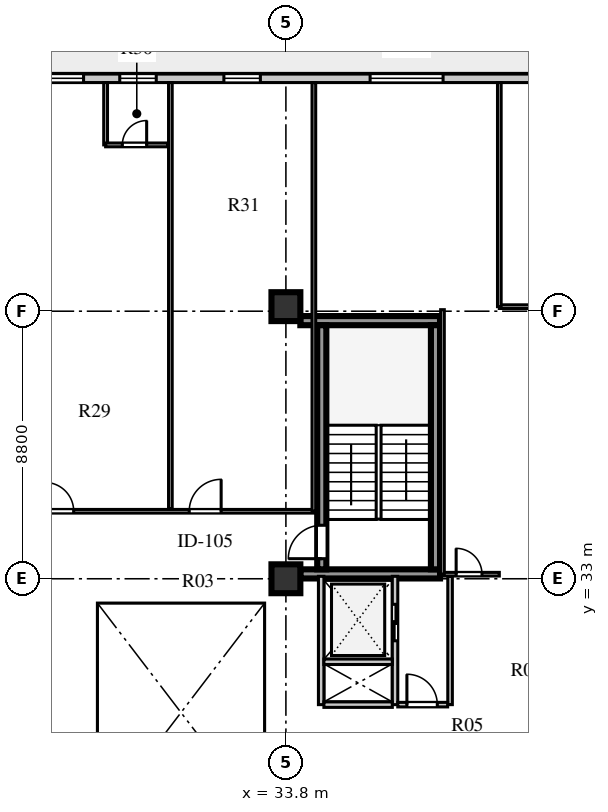
"""IFC4 building model, lengths in metres.
Left out: names, types, materials, properties, quantities, classifications, styles, units other than length and angle.
Written with IfcOpenShell. Run it as: python <this file> out.ifc"""

import sys

from ifc_helpers import new_model, si_unit, direction, frame, frame_2d, origin, origin_2d, place, context, subcontext, project, spatial, rectangle, extrude, element, fill, save


model = new_model("IFC4")
c1 = context("Model", 3, precision=1e-05, world=origin(), true_north=direction((0.0, 1.0)))
c2 = subcontext(c1, "Body", "Model", "MODEL_VIEW")
j1 = project(units=[si_unit("LENGTHUNIT", "METRE"), si_unit("PLANEANGLEUNIT", "RADIAN")], contexts=[c1])
p1 = place(None, origin())
s1 = spatial("IfcSite", under=j1, at=p1, CompositionType="ELEMENT")
p2 = place(p1, origin())
s2 = spatial("IfcBuilding", under=s1, at=p2, CompositionType="ELEMENT")
p3 = place(p2, frame((0.0, 0.0, 181.0)))
s3 = spatial("IfcBuildingStorey", under=s2, at=p3, CompositionType="ELEMENT", Elevation=181.0)
for number, where, z_axis, x_axis in (
    (1, (34.275, 33.16, 0.0), (0.0, 0.0, 1.0), (1.0, 0.0, 0.0)),
    (2, (34.275, 41.49, 0.0), (0.0, 0.0, 1.0), (1.0, 0.0, 0.0)),
):
    element("IfcWall", number, at=place(p3, frame(where, z_axis=z_axis, x_axis=x_axis)), inside=s3, PredefinedType="SHEAR", context=c2, shape_type="SweptSolid", body=[
        extrude(rectangle(XDim=4.595, YDim=0.3, at=frame_2d((2.298, 0.0))), origin(), (0.0, 0.0, 1.0), 3.6),
    ])
p4 = place(p3, frame((34.98, 33.31, 0.0), z_axis=(0.0, 0.0, 1.0), x_axis=(0.0, 1.0, 0.0)))
e3 = element("IfcWall", 3, at=p4, inside=s3, PredefinedType="SHEAR", context=c2, shape_type="SweptSolid", body=[
    extrude(rectangle(XDim=8.03, YDim=0.3, at=frame_2d((4.015, 0.0))), origin(), (0.0, 0.0, 1.0), 3.6),
])
p5 = place(p4, frame((0.35, 0.0, 0.0)))
e4 = element("IfcOpeningElement", 4, at=p5, cuts=e3, PredefinedType="OPENING", context=c2, shape_type="SweptSolid", body=[
    extrude(rectangle(XDim=1.1, YDim=2.1, at=frame_2d((0.55, 1.05))), frame((0.0, 0.16, 0.0), z_axis=(0.0, -1.0, 0.0), x_axis=(1.0, 0.0, 0.0)), (0.0, 0.0, 1.0), 0.32),
])
p6 = place(p3, frame((38.72, 33.31, 0.0), z_axis=(0.0, 0.0, 1.0), x_axis=(0.0, 1.0, 0.0)))
e5 = element("IfcWall", 5, at=p6, inside=s3, PredefinedType="SHEAR", context=c2, shape_type="SweptSolid", body=[
    extrude(rectangle(XDim=8.03, YDim=0.3, at=frame_2d((4.015, 0.0))), origin(), (0.0, 0.0, 1.0), 3.6),
])
for number, where, z_axis, x_axis in (
    (6, (33.8, 33.0, 0.0), (0.0, 0.0, 1.0), (1.0, 0.0, 0.0)),
    (7, (33.8, 41.95, 0.0), (0.0, 0.0, 1.0), (1.0, 0.0, 0.0)),
):
    element("IfcColumn", number, at=place(p3, frame(where, z_axis=z_axis, x_axis=x_axis)), inside=s3, PredefinedType="COLUMN", context=c2, shape_type="SweptSolid", body=[
        extrude(rectangle(XDim=0.95, YDim=0.95, at=origin_2d()), origin(), (0.0, 0.0, 1.0), 3.6),
    ])
p7 = place(p3, frame((45.55, 49.46, 0.0), z_axis=(0.0, 0.0, 1.0), x_axis=(-1.0, 0.0, 0.0)))
e8 = element("IfcWall", 8, at=p7, inside=s3, PredefinedType="STANDARD", context=c2, shape_type="SweptSolid", body=[
    extrude(rectangle(XDim=32.5, YDim=0.28, at=frame_2d((16.25, 0.0))), origin(), (0.0, 0.0, 1.0), 3.6),
])
p8 = place(p7, frame((30.55, 0.0, 0.0)))
e9 = element("IfcOpeningElement", 9, at=p8, cuts=e8, PredefinedType="OPENING", context=c2, shape_type="SweptSolid", body=[
    extrude(rectangle(XDim=1.0, YDim=2.05, at=frame_2d((0.5, 1.025))), frame((0.0, 0.15, 0.0), z_axis=(0.0, -1.0, 0.0), x_axis=(1.0, 0.0, 0.0)), (0.0, 0.0, 1.0), 0.3),
])
p9 = place(p7, frame((24.345, 0.0, 0.8)))
e10 = element("IfcOpeningElement", 10, at=p9, cuts=e8, PredefinedType="OPENING", context=c2, shape_type="SweptSolid", body=[
    extrude(rectangle(XDim=2.25, YDim=2.0, at=frame_2d((1.125, 1.0))), frame((0.0, 0.15, 0.0), z_axis=(0.0, -1.0, 0.0), x_axis=(1.0, 0.0, 0.0)), (0.0, 0.0, 1.0), 0.3),
])
p10 = place(p7, frame((18.405, 0.0, 0.8)))
e11 = element("IfcOpeningElement", 11, at=p10, cuts=e8, PredefinedType="OPENING", context=c2, shape_type="SweptSolid", body=[
    extrude(rectangle(XDim=1.2, YDim=1.75, at=frame_2d((0.6, 0.875))), frame((0.0, 0.15, 0.0), z_axis=(0.0, -1.0, 0.0), x_axis=(1.0, 0.0, 0.0)), (0.0, 0.0, 1.0), 0.3),
])
p11 = place(p7, frame((16.015, 0.0, 0.8)))
e12 = element("IfcOpeningElement", 12, at=p11, cuts=e8, PredefinedType="OPENING", context=c2, shape_type="SweptSolid", body=[
    extrude(rectangle(XDim=1.2, YDim=1.75, at=frame_2d((0.6, 0.875))), frame((0.0, 0.15, 0.0), z_axis=(0.0, -1.0, 0.0), x_axis=(1.0, 0.0, 0.0)), (0.0, 0.0, 1.0), 0.3),
])
p12 = place(p7, frame((12.59, 0.0, 0.8)))
e13 = element("IfcOpeningElement", 13, at=p12, cuts=e8, PredefinedType="OPENING", context=c2, shape_type="SweptSolid", body=[
    extrude(rectangle(XDim=1.2, YDim=1.75, at=frame_2d((0.6, 0.875))), frame((0.0, 0.15, 0.0), z_axis=(0.0, -1.0, 0.0), x_axis=(1.0, 0.0, 0.0)), (0.0, 0.0, 1.0), 0.3),
])
p13 = place(p7, frame((6.58, 0.0, 0.8)))
e14 = element("IfcOpeningElement", 14, at=p13, cuts=e8, PredefinedType="OPENING", context=c2, shape_type="SweptSolid", body=[
    extrude(rectangle(XDim=2.4, YDim=2.05, at=frame_2d((1.2, 1.025))), frame((0.0, 0.15, 0.0), z_axis=(0.0, -1.0, 0.0), x_axis=(1.0, 0.0, 0.0)), (0.0, 0.0, 1.0), 0.3),
])
p14 = place(p7, frame((1.37, 0.0, 0.8)))
e15 = element("IfcOpeningElement", 15, at=p14, cuts=e8, PredefinedType="OPENING", context=c2, shape_type="SweptSolid", body=[
    extrude(rectangle(XDim=2.1, YDim=1.95, at=frame_2d((1.05, 0.975))), frame((0.0, 0.15, 0.0), z_axis=(0.0, -1.0, 0.0), x_axis=(1.0, 0.0, 0.0)), (0.0, 0.0, 1.0), 0.3),
])
p15 = place(p3, frame((34.96, 28.86, 0.0), z_axis=(0.0, 0.0, 1.0), x_axis=(0.0, 1.0, 0.0)))
e16 = element("IfcWall", 16, at=p15, inside=s3, PredefinedType="SOLIDWALL", context=c2, shape_type="SweptSolid", body=[
    extrude(rectangle(XDim=4.22, YDim=0.18, at=frame_2d((2.11, 0.0))), origin(), (0.0, 0.0, 1.0), 3.6),
])
p16 = place(p3, frame((37.39, 28.86, 0.0), z_axis=(0.0, 0.0, 1.0), x_axis=(0.0, 1.0, 0.0)))
e17 = element("IfcWall", 17, at=p16, inside=s3, PredefinedType="SOLIDWALL", context=c2, shape_type="SweptSolid", body=[
    extrude(rectangle(XDim=4.22, YDim=0.18, at=frame_2d((2.11, 0.0))), origin(), (0.0, 0.0, 1.0), 3.6),
])
p17 = place(p16, frame((2.1, 0.0, 0.0)))
e18 = element("IfcOpeningElement", 18, at=p17, cuts=e17, PredefinedType="OPENING", context=c2, shape_type="SweptSolid", body=[
    extrude(rectangle(XDim=1.2, YDim=2.12, at=frame_2d((0.6, 1.06))), frame((0.0, 0.1, 0.0), z_axis=(0.0, -1.0, 0.0), x_axis=(1.0, 0.0, 0.0)), (0.0, 0.0, 1.0), 0.2),
])
for number, where, z_axis, x_axis in (
    (19, (35.05, 28.86, 0.0), (0.0, 0.0, 1.0), (1.0, 0.0, 0.0)),
    (20, (35.05, 30.27, 0.0), (0.0, 0.0, 1.0), (1.0, 0.0, 0.0)),
):
    element("IfcWall", number, at=place(p3, frame(where, z_axis=z_axis, x_axis=x_axis)), inside=s3, PredefinedType="SOLIDWALL", context=c2, shape_type="SweptSolid", body=[
        extrude(rectangle(XDim=2.25, YDim=0.18, at=frame_2d((1.125, 0.0))), origin(), (0.0, 0.0, 1.0), 3.6),
    ])
p18 = place(p3, frame((39.2, 28.86, 0.0), z_axis=(0.0, 0.0, 1.0), x_axis=(0.0, 1.0, 0.0)))
e21 = element("IfcWall", 21, at=p18, inside=s3, PredefinedType="PARTITIONING", context=c2, shape_type="SweptSolid", body=[
    extrude(rectangle(XDim=4.22, YDim=0.15, at=frame_2d((2.11, 0.0))), origin(), (0.0, 0.0, 1.0), 3.6),
])
p19 = place(p3, frame((37.48, 28.86, 0.0), z_axis=(0.0, 0.0, 1.0), x_axis=(1.0, 0.0, 0.0)))
e22 = element("IfcWall", 22, at=p19, inside=s3, PredefinedType="PARTITIONING", context=c2, shape_type="SweptSolid", body=[
    extrude(rectangle(XDim=1.64, YDim=0.15, at=frame_2d((0.82, 0.0))), origin(), (0.0, 0.0, 1.0), 3.6),
])
p20 = place(p19, frame((0.3, 0.0, 0.0)))
e23 = element("IfcOpeningElement", 23, at=p20, cuts=e22, PredefinedType="OPENING", context=c2, shape_type="SweptSolid", body=[
    extrude(rectangle(XDim=1.0, YDim=2.1, at=frame_2d((0.5, 1.05))), frame((0.0, 0.085, 0.0), z_axis=(0.0, -1.0, 0.0), x_axis=(1.0, 0.0, 0.0)), (0.0, 0.0, 1.0), 0.17),
])
p21 = place(p3, frame((25.22, 35.22, 0.0), z_axis=(0.0, 0.0, 1.0), x_axis=(1.0, 0.0, 0.0)))
e24 = element("IfcWall", 24, at=p21, inside=s3, PredefinedType="PARTITIONING", context=c2, shape_type="SweptSolid", body=[
    extrude(rectangle(XDim=9.5, YDim=0.12, at=frame_2d((4.75, 0.0))), origin(), (0.0, 0.0, 1.0), 3.6),
])
p22 = place(p21, frame((0.65, 0.0, 0.0)))
e25 = element("IfcOpeningElement", 25, at=p22, cuts=e24, PredefinedType="OPENING", context=c2, shape_type="SweptSolid", body=[
    extrude(rectangle(XDim=0.95, YDim=2.1, at=frame_2d((0.475, 1.05))), frame((0.0, 0.07, 0.0), z_axis=(0.0, -1.0, 0.0), x_axis=(1.0, 0.0, 0.0)), (0.0, 0.0, 1.0), 0.14),
])
p23 = place(p21, frame((5.4, 0.0, 0.0)))
e26 = element("IfcOpeningElement", 26, at=p23, cuts=e24, PredefinedType="OPENING", context=c2, shape_type="SweptSolid", body=[
    extrude(rectangle(XDim=1.05, YDim=2.1, at=frame_2d((0.525, 1.05))), frame((0.0, 0.07, 0.0), z_axis=(0.0, -1.0, 0.0), x_axis=(1.0, 0.0, 0.0)), (0.0, 0.0, 1.0), 0.14),
])
p24 = place(p3, frame((40.82, 41.95, 0.0), z_axis=(0.0, 0.0, 1.0), x_axis=(1.0, 0.0, 0.0)))
e27 = element("IfcWall", 27, at=p24, inside=s3, PredefinedType="PARTITIONING", context=c2, shape_type="SweptSolid", body=[
    extrude(rectangle(XDim=9.7, YDim=0.12, at=frame_2d((4.85, 0.0))), origin(), (0.0, 0.0, 1.0), 2.95),
])
p25 = place(p3, frame((34.72, 35.22, 0.0), z_axis=(0.0, 0.0, 1.0), x_axis=(0.0, 1.0, 0.0)))
e28 = element("IfcWall", 28, at=p25, inside=s3, PredefinedType="PARTITIONING", context=c2, shape_type="SweptSolid", body=[
    extrude(rectangle(XDim=14.1, YDim=0.12, at=frame_2d((7.05, 0.0))), origin(), (0.0, 0.0, 1.0), 3.6),
])
p26 = place(p3, frame((30.0, 35.3, 0.0), z_axis=(0.0, 0.0, 1.0), x_axis=(0.0, 1.0, 0.0)))
e29 = element("IfcWall", 29, at=p26, inside=s3, PredefinedType="PARTITIONING", context=c2, shape_type="SweptSolid", body=[
    extrude(rectangle(XDim=14.02, YDim=0.12, at=frame_2d((7.01, 0.0))), origin(), (0.0, 0.0, 1.0), 3.6),
])
p27 = place(p3, frame((27.87, 47.27, 0.0), z_axis=(0.0, 0.0, 1.0), x_axis=(0.0, 1.0, 0.0)))
e30 = element("IfcWall", 30, at=p27, inside=s3, PredefinedType="PLUMBINGWALL", context=c2, shape_type="SweptSolid", body=[
    extrude(rectangle(XDim=2.05, YDim=0.125, at=frame_2d((1.025, 0.0))), origin(), (0.0, 0.0, 1.0), 3.6),
])
p28 = place(p3, frame((27.87, 47.27, 0.0), z_axis=(0.0, 0.0, 1.0), x_axis=(1.0, 0.0, 0.0)))
e31 = element("IfcWall", 31, at=p28, inside=s3, PredefinedType="PLUMBINGWALL", context=c2, shape_type="SweptSolid", body=[
    extrude(rectangle(XDim=2.05, YDim=0.125, at=frame_2d((1.025, 0.0))), origin(), (0.0, 0.0, 1.0), 3.6),
])
p29 = place(p28, frame((0.55, 0.0, 0.0)))
e32 = element("IfcOpeningElement", 32, at=p29, cuts=e31, PredefinedType="OPENING", context=c2, shape_type="SweptSolid", body=[
    extrude(rectangle(XDim=0.8, YDim=2.05, at=frame_2d((0.4, 1.025))), frame((0.0, 0.073, 0.0), z_axis=(0.0, -1.0, 0.0), x_axis=(1.0, 0.0, 0.0)), (0.0, 0.0, 1.0), 0.145),
])
p30 = place(p3, frame((38.95, 33.15, 0.0), z_axis=(0.0, 0.0, 1.0), x_axis=(1.0, 0.0, 0.0)))
e33 = element("IfcWall", 33, at=p30, inside=s3, PredefinedType="PARTITIONING", context=c2, shape_type="SweptSolid", body=[
    extrude(rectangle(XDim=1.87, YDim=0.12, at=frame_2d((0.935, 0.0))), origin(), (0.0, 0.0, 1.0), 3.6),
])
p31 = place(p30, frame((0.45, 0.0, 0.0)))
e34 = element("IfcOpeningElement", 34, at=p31, cuts=e33, PredefinedType="OPENING", context=c2, shape_type="SweptSolid", body=[
    extrude(rectangle(XDim=0.85, YDim=2.05, at=frame_2d((0.425, 1.025))), frame((0.0, 0.07, 0.0), z_axis=(0.0, -1.0, 0.0), x_axis=(1.0, 0.0, 0.0)), (0.0, 0.0, 1.0), 0.14),
])
p32 = place(p3, frame((38.95, 33.15, 0.0), z_axis=(0.0, 0.0, 1.0), x_axis=(0.0, 1.0, 0.0)))
e35 = element("IfcWall", 35, at=p32, inside=s3, PredefinedType="PARTITIONING", context=c2, shape_type="SweptSolid", body=[
    extrude(rectangle(XDim=8.7, YDim=0.12, at=frame_2d((4.35, 0.0))), origin(), (0.0, 0.0, 1.0), 3.6),
])
p33 = place(p3, frame((40.82, 41.95, 0.0), z_axis=(0.0, 0.0, 1.0), x_axis=(0.0, 1.0, 0.0)))
e36 = element("IfcWall", 36, at=p33, inside=s3, PredefinedType="PARTITIONING", context=c2, shape_type="SweptSolid", body=[
    extrude(rectangle(XDim=7.37, YDim=0.12, at=frame_2d((3.685, 0.0))), origin(), (0.0, 0.0, 1.0), 3.6),
])
p34 = place(p10, origin())
e37 = element("IfcWindow", 37, at=p34, inside=s3, PartitioningType="SINGLE_PANEL", PredefinedType="WINDOW", context=c2, shape_type="SweptSolid", body=[
    extrude(rectangle(XDim=1.2, YDim=1.75, at=frame_2d((0.6, 0.875))), frame((0.0, 0.03, 0.0), z_axis=(0.0, -1.0, 0.0), x_axis=(1.0, 0.0, 0.0)), (0.0, 0.0, 1.0), 0.06),
])
fill(e11, e37)
p35 = place(p11, origin())
e38 = element("IfcWindow", 38, at=p35, inside=s3, PartitioningType="SINGLE_PANEL", PredefinedType="WINDOW", context=c2, shape_type="SweptSolid", body=[
    extrude(rectangle(XDim=1.2, YDim=1.75, at=frame_2d((0.6, 0.875))), frame((0.0, 0.03, 0.0), z_axis=(0.0, -1.0, 0.0), x_axis=(1.0, 0.0, 0.0)), (0.0, 0.0, 1.0), 0.06),
])
fill(e12, e38)
p36 = place(p12, origin())
e39 = element("IfcWindow", 39, at=p36, inside=s3, PartitioningType="SINGLE_PANEL", PredefinedType="WINDOW", context=c2, shape_type="SweptSolid", body=[
    extrude(rectangle(XDim=1.2, YDim=1.75, at=frame_2d((0.6, 0.875))), frame((0.0, 0.03, 0.0), z_axis=(0.0, -1.0, 0.0), x_axis=(1.0, 0.0, 0.0)), (0.0, 0.0, 1.0), 0.06),
])
fill(e13, e39)
p37 = place(p13, origin())
e40 = element("IfcWindow", 40, at=p37, inside=s3, PartitioningType="SINGLE_PANEL", PredefinedType="WINDOW", context=c2, shape_type="SweptSolid", body=[
    extrude(rectangle(XDim=2.4, YDim=2.05, at=frame_2d((1.2, 1.025))), frame((0.0, 0.03, 0.0), z_axis=(0.0, -1.0, 0.0), x_axis=(1.0, 0.0, 0.0)), (0.0, 0.0, 1.0), 0.06),
])
fill(e14, e40)
p38 = place(p5, origin())
e41 = element("IfcDoor", 41, at=p38, inside=s3, OperationType="SINGLE_SWING_LEFT", PredefinedType="DOOR", context=c2, shape_type="SweptSolid", body=[
    extrude(rectangle(XDim=1.1, YDim=2.1, at=frame_2d((0.55, 1.05))), frame((0.0, 0.025, 0.0), z_axis=(0.0, -1.0, 0.0), x_axis=(1.0, 0.0, 0.0)), (0.0, 0.0, 1.0), 0.05),
])
fill(e4, e41)
p39 = place(p17, frame((1.2, 0.0, 0.0), z_axis=(0.0, 0.0, 1.0), x_axis=(-1.0, 0.0, 0.0)))
e42 = element("IfcDoor", 42, at=p39, inside=s3, OperationType="DOUBLE_DOOR_SLIDING", PredefinedType="DOOR", context=c2, shape_type="SweptSolid", body=[
    extrude(rectangle(XDim=1.2, YDim=2.12, at=frame_2d((0.6, 1.06))), frame((0.0, 0.025, 0.0), z_axis=(0.0, -1.0, 0.0), x_axis=(1.0, 0.0, 0.0)), (0.0, 0.0, 1.0), 0.05),
])
fill(e18, e42)
p40 = place(p20, origin())
e43 = element("IfcDoor", 43, at=p40, inside=s3, OperationType="SINGLE_SWING_LEFT", PredefinedType="DOOR", context=c2, shape_type="SweptSolid", body=[
    extrude(rectangle(XDim=1.0, YDim=2.1, at=frame_2d((0.5, 1.05))), frame((0.0, 0.025, 0.0), z_axis=(0.0, -1.0, 0.0), x_axis=(1.0, 0.0, 0.0)), (0.0, 0.0, 1.0), 0.05),
])
fill(e23, e43)
p41 = place(p22, origin())
e44 = element("IfcDoor", 44, at=p41, inside=s3, OperationType="SINGLE_SWING_LEFT", PredefinedType="DOOR", context=c2, shape_type="SweptSolid", body=[
    extrude(rectangle(XDim=0.95, YDim=2.1, at=frame_2d((0.475, 1.05))), frame((0.0, 0.025, 0.0), z_axis=(0.0, -1.0, 0.0), x_axis=(1.0, 0.0, 0.0)), (0.0, 0.0, 1.0), 0.05),
])
fill(e25, e44)
p42 = place(p29, frame((0.8, 0.0, 0.0), z_axis=(0.0, 0.0, 1.0), x_axis=(-1.0, 0.0, 0.0)))
e45 = element("IfcDoor", 45, at=p42, inside=s3, OperationType="SINGLE_SWING_LEFT", PredefinedType="DOOR", context=c2, shape_type="SweptSolid", body=[
    extrude(rectangle(XDim=0.8, YDim=2.05, at=frame_2d((0.4, 1.025))), frame((0.0, 0.025, 0.0), z_axis=(0.0, -1.0, 0.0), x_axis=(1.0, 0.0, 0.0)), (0.0, 0.0, 1.0), 0.05),
])
fill(e32, e45)
p43 = place(p23, origin())
e46 = element("IfcDoor", 46, at=p43, inside=s3, OperationType="SINGLE_SWING_RIGHT", PredefinedType="DOOR", context=c2, shape_type="SweptSolid", body=[
    extrude(rectangle(XDim=1.05, YDim=2.1, at=frame_2d((0.525, 1.05))), frame((0.0, 0.025, 0.0), z_axis=(0.0, -1.0, 0.0), x_axis=(1.0, 0.0, 0.0)), (0.0, 0.0, 1.0), 0.05),
])
fill(e26, e46)
p44 = place(p31, origin())
e47 = element("IfcDoor", 47, at=p44, inside=s3, OperationType="SINGLE_SWING_LEFT", PredefinedType="DOOR", context=c2, shape_type="SweptSolid", body=[
    extrude(rectangle(XDim=0.85, YDim=2.05, at=frame_2d((0.425, 1.025))), frame((0.0, 0.025, 0.0), z_axis=(0.0, -1.0, 0.0), x_axis=(1.0, 0.0, 0.0)), (0.0, 0.0, 1.0), 0.05),
])
fill(e34, e47)
save(model, sys.argv[1])
